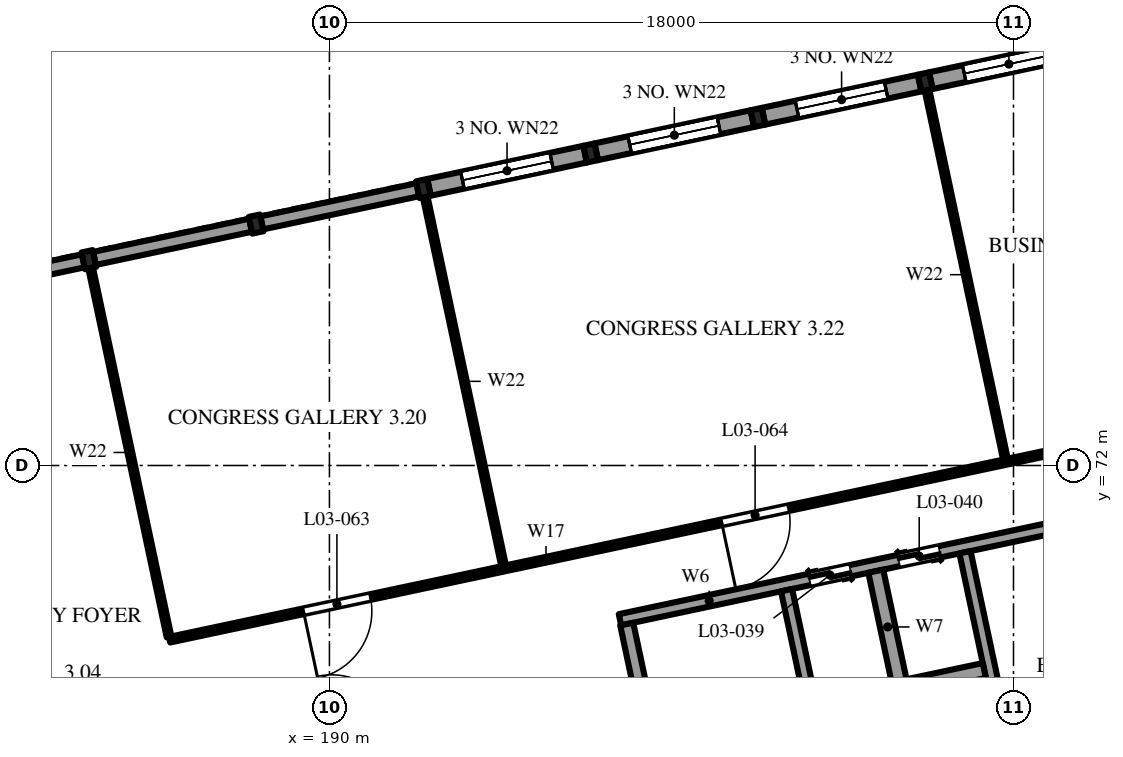
"""IFC4 building model, lengths in metres.
Left out: names, types, materials, properties, quantities, classifications, styles, units other than length and angle.
Written with IfcOpenShell. Run it as: python <this file> out.ifc"""

import sys

from ifc_helpers import new_model, si_unit, direction, frame, frame_2d, origin, origin_2d, place, context, subcontext, project, spatial, polyline, rectangle, i_section, outline, extrude, element, fill, save


model = new_model("IFC4")
c1 = context("Model", 3, precision=1e-05, world=origin(), true_north=direction((0.0, 1.0)))
c2 = subcontext(c1, "Body", "Model", "MODEL_VIEW")
j1 = project(units=[si_unit("LENGTHUNIT", "METRE"), si_unit("PLANEANGLEUNIT", "RADIAN")], contexts=[c1])
p1 = place(None, origin())
s1 = spatial("IfcSite", under=j1, at=p1, CompositionType="ELEMENT")
p2 = place(p1, origin())
s2 = spatial("IfcBuilding", under=s1, at=p2, CompositionType="ELEMENT")
p3 = place(p2, frame((0.0, 0.0, 16.8)))
s3 = spatial("IfcBuildingStorey", under=s2, at=p3, CompositionType="ELEMENT", Elevation=16.8)
for number, where, z_axis, x_axis in (
    (1, (183.669, 77.417, 0.0), (0.0, 0.0, 1.0), (0.978, 0.208, 0.0)),
    (2, (188.071, 78.353, 0.0), (0.0, 0.0, 1.0), (0.978, 0.208, 0.0)),
    (3, (192.473, 79.289, 0.0), (0.0, 0.0, 1.0), (0.978, 0.208, 0.0)),
    (4, (196.874, 80.224, 0.0), (0.0, 0.0, 1.0), (0.978, 0.208, 0.0)),
    (5, (201.276, 81.16, 0.0), (0.0, 0.0, 1.0), (0.978, 0.208, 0.0)),
    (6, (205.678, 82.095, 0.0), (0.0, 0.0, 1.0), (0.978, 0.208, 0.0)),
):
    element("IfcColumn", number, at=place(p3, frame(where, z_axis=z_axis, x_axis=x_axis)), inside=s3, PredefinedType="COLUMN", context=c2, shape_type="SweptSolid", body=[
        extrude(i_section(OverallWidth=0.3, OverallDepth=0.45, WebThickness=0.014, FlangeThickness=0.026, FilletRadius=0.027, at=origin_2d()), origin(), (0.0, 0.0, 1.0), 4.8),
    ])
p4 = place(p3, frame((197.645, 67.941, 0.0), z_axis=(0.0, 0.0, 1.0), x_axis=(0.978147662755, 0.20791139903, 0.0)))
e7 = element("IfcWall", 7, at=p4, inside=s3, PredefinedType="SHEAR", context=c2, shape_type="SweptSolid", body=[
    extrude(outline(polyline([(0.0, 0.0), (13.7, 0.0), (13.7, 14.542), (0.0, 13.809), (0.0, 0.0)])), frame((0.0, 0.15, 0.0), z_axis=(0.0, -1.0, 0.0), x_axis=(1.0, 0.0, 0.0)), (0.0, 0.0, 1.0), 0.3),
])
p5 = place(p4, frame((5.1, 0.0, 0.0)))
e8 = element("IfcOpeningElement", 8, at=p5, cuts=e7, PredefinedType="OPENING", context=c2, shape_type="SweptSolid", body=[
    extrude(rectangle(XDim=1.1, YDim=2.1, at=frame_2d((0.55, 1.05))), frame((0.0, 0.16, 0.0), z_axis=(0.0, -1.0, 0.0), x_axis=(1.0, 0.0, 0.0)), (0.0, 0.0, 1.0), 0.32),
])
p6 = place(p4, frame((7.5, 0.0, 0.0)))
e9 = element("IfcOpeningElement", 9, at=p6, cuts=e7, PredefinedType="OPENING", context=c2, shape_type="SweptSolid", body=[
    extrude(rectangle(XDim=1.1, YDim=2.1, at=frame_2d((0.55, 1.05))), frame((0.0, 0.16, 0.0), z_axis=(0.0, -1.0, 0.0), x_axis=(1.0, 0.0, 0.0)), (0.0, 0.0, 1.0), 0.32),
])
p7 = place(p3, frame((199.486, 60.0, 0.0), z_axis=(0.0, 0.0, 1.0), x_axis=(-0.207915693476, 0.978146749934, 0.0)))
e10 = element("IfcWall", 10, at=p7, inside=s3, PredefinedType="SOLIDWALL", context=c2, shape_type="SweptSolid", body=[
    extrude(outline(polyline([(0.0, 0.0), (8.0, 0.0), (8.0, 13.824), (0.0, 14.244), (0.0, 0.0)])), frame((0.0, 0.175, 0.0), z_axis=(0.0, -1.0, 0.0), x_axis=(1.0, 0.0, 0.0)), (0.0, 0.0, 1.0), 0.35),
])
p8 = place(p7, frame((0.3, 0.0, 0.0)))
e11 = element("IfcOpeningElement", 11, at=p8, cuts=e10, PredefinedType="OPENING", context=c2, shape_type="SweptSolid", body=[
    extrude(rectangle(XDim=1.2, YDim=2.1, at=frame_2d((0.6, 1.05))), frame((0.0, 0.185, 0.0), z_axis=(0.0, -1.0, 0.0), x_axis=(1.0, 0.0, 0.0)), (0.0, 0.0, 1.0), 0.37),
])
p9 = place(p3, frame((203.692, 60.894, 0.0), z_axis=(0.0, 0.0, 1.0), x_axis=(-0.207915693476, 0.978146749934, 0.0)))
e12 = element("IfcWall", 12, at=p9, inside=s3, PredefinedType="SHEAR", context=c2, shape_type="SweptSolid", body=[
    extrude(outline(polyline([(0.0, 0.0), (8.0, 0.0), (8.0, 14.054), (0.0, 14.474), (0.0, 0.0)])), frame((0.0, 0.15, 0.0), z_axis=(0.0, -1.0, 0.0), x_axis=(1.0, 0.0, 0.0)), (0.0, 0.0, 1.0), 0.3),
])
p10 = place(p3, frame((208.387, 61.892, 0.0), z_axis=(0.0, 0.0, 1.0), x_axis=(-0.207915693476, 0.978146749934, 0.0)))
e13 = element("IfcWall", 13, at=p10, inside=s3, PredefinedType="SHEAR", context=c2, shape_type="SweptSolid", body=[
    extrude(outline(polyline([(0.0, 0.0), (8.0, 0.0), (8.0, 14.311), (0.0, 14.731), (0.0, 0.0)])), frame((0.0, 0.15, 0.0), z_axis=(0.0, -1.0, 0.0), x_axis=(1.0, 0.0, 0.0)), (0.0, 0.0, 1.0), 0.3),
])
p11 = place(p3, frame((205.0, 66.284, 0.0), z_axis=(0.0, 0.0, 1.0), x_axis=(-0.207933702079, 0.978142921837, 0.0)))
e14 = element("IfcWall", 14, at=p11, inside=s3, PredefinedType="SHEAR", context=c2, shape_type="SweptSolid", body=[
    extrude(outline(polyline([(0.0, 0.0), (3.0, 0.0), (3.0, 14.183), (0.0, 14.34), (0.0, 0.0)])), frame((0.0, 0.2, 0.0), z_axis=(0.0, -1.0, 0.0), x_axis=(1.0, 0.0, 0.0)), (0.0, 0.0, 1.0), 0.4),
])
p12 = place(p3, frame((202.831, 65.669, 0.0), z_axis=(0.0, 0.0, 1.0), x_axis=(0.978149611564, 0.20790223038, 0.0)))
e15 = element("IfcWall", 15, at=p12, inside=s3, PredefinedType="SHEAR", context=c2, shape_type="SweptSolid", body=[
    extrude(outline(polyline([(0.0, 0.0), (4.5, 0.0), (4.5, 14.469), (0.0, 14.228), (0.0, 0.0)])), frame((0.0, 0.2, 0.0), z_axis=(0.0, -1.0, 0.0), x_axis=(1.0, 0.0, 0.0)), (0.0, 0.0, 1.0), 0.4),
])
p13 = place(p3, frame((179.415, 76.513, 0.0), z_axis=(0.0, 0.0, 1.0), x_axis=(0.978155748334, 0.207873355681, 0.0)))
e16 = element("IfcWall", 16, at=p13, inside=s3, PredefinedType="SOLIDWALL", context=c2, shape_type="SweptSolid", body=[
    extrude(outline(polyline([(0.0, 0.0), (4.2, 0.0), (4.2, 13.836), (0.0, 13.612), (0.0, 0.0)])), frame((0.0, 0.175, 0.0), z_axis=(0.0, -1.0, 0.0), x_axis=(1.0, 0.0, 0.0)), (0.0, 0.0, 1.0), 0.35),
])
p14 = place(p3, frame((183.816, 77.448, 0.0), z_axis=(0.0, 0.0, 1.0), x_axis=(0.978143927149, 0.207928972925, 0.0)))
e17 = element("IfcWall", 17, at=p14, inside=s3, PredefinedType="SOLIDWALL", context=c2, shape_type="SweptSolid", body=[
    extrude(outline(polyline([(0.0, 0.0), (4.2, 0.0), (4.2, 14.077), (0.0, 13.853), (0.0, 0.0)])), frame((0.0, 0.175, 0.0), z_axis=(0.0, -1.0, 0.0), x_axis=(1.0, 0.0, 0.0)), (0.0, 0.0, 1.0), 0.35),
])
p15 = place(p3, frame((188.218, 78.384, 0.0), z_axis=(0.0, 0.0, 1.0), x_axis=(0.978143927149, 0.207928972925, 0.0)))
e18 = element("IfcWall", 18, at=p15, inside=s3, PredefinedType="SOLIDWALL", context=c2, shape_type="SweptSolid", body=[
    extrude(outline(polyline([(0.0, 0.0), (4.2, 0.0), (4.2, 14.318), (0.0, 14.093), (0.0, 0.0)])), frame((0.0, 0.175, 0.0), z_axis=(0.0, -1.0, 0.0), x_axis=(1.0, 0.0, 0.0)), (0.0, 0.0, 1.0), 0.35),
])
p16 = place(p3, frame((192.619, 79.32, 0.0), z_axis=(0.0, 0.0, 1.0), x_axis=(0.978143927149, 0.207928972925, 0.0)))
e19 = element("IfcWall", 19, at=p16, inside=s3, PredefinedType="SOLIDWALL", context=c2, shape_type="SweptSolid", body=[
    extrude(outline(polyline([(0.0, 0.0), (4.2, 0.0), (4.2, 14.559), (0.0, 14.334), (0.0, 0.0)])), frame((0.0, 0.225, 0.0), z_axis=(0.0, -1.0, 0.0), x_axis=(1.0, 0.0, 0.0)), (0.0, 0.0, 1.0), 0.45),
])
p17 = place(p16, frame((0.9, 0.0, 0.9)))
e20 = element("IfcOpeningElement", 20, at=p17, cuts=e19, PredefinedType="OPENING", context=c2, shape_type="SweptSolid", body=[
    extrude(rectangle(XDim=2.4, YDim=2.4, at=frame_2d((1.2, 1.2))), frame((0.0, 0.235, 0.0), z_axis=(0.0, -1.0, 0.0), x_axis=(1.0, 0.0, 0.0)), (0.0, 0.0, 1.0), 0.47),
])
p18 = place(p16, frame((0.9, 0.0, 5.1)))
e21 = element("IfcOpeningElement", 21, at=p18, cuts=e19, PredefinedType="OPENING", context=c2, shape_type="SweptSolid", body=[
    extrude(rectangle(XDim=2.4, YDim=2.4, at=frame_2d((1.2, 1.2))), frame((0.0, 0.235, 0.0), z_axis=(0.0, -1.0, 0.0), x_axis=(1.0, 0.0, 0.0)), (0.0, 0.0, 1.0), 0.47),
])
p19 = place(p16, frame((0.9, 0.0, 9.3)))
e22 = element("IfcOpeningElement", 22, at=p19, cuts=e19, PredefinedType="OPENING", context=c2, shape_type="SweptSolid", body=[
    extrude(rectangle(XDim=2.4, YDim=2.4, at=frame_2d((1.2, 1.2))), frame((0.0, 0.235, 0.0), z_axis=(0.0, -1.0, 0.0), x_axis=(1.0, 0.0, 0.0)), (0.0, 0.0, 1.0), 0.47),
])
p20 = place(p3, frame((197.021, 80.255, 0.0), z_axis=(0.0, 0.0, 1.0), x_axis=(0.97815826, 0.207861536591, 0.0)))
e23 = element("IfcWall", 23, at=p20, inside=s3, PredefinedType="SOLIDWALL", context=c2, shape_type="SweptSolid", body=[
    extrude(outline(polyline([(0.0, 0.0), (4.2, 0.0), (4.2, 14.8), (0.0, 14.575), (0.0, 0.0)])), frame((0.0, 0.225, 0.0), z_axis=(0.0, -1.0, 0.0), x_axis=(1.0, 0.0, 0.0)), (0.0, 0.0, 1.0), 0.45),
])
p21 = place(p20, frame((0.9, 0.0, 0.9)))
e24 = element("IfcOpeningElement", 24, at=p21, cuts=e23, PredefinedType="OPENING", context=c2, shape_type="SweptSolid", body=[
    extrude(rectangle(XDim=2.4, YDim=2.4, at=frame_2d((1.2, 1.2))), frame((0.0, 0.235, 0.0), z_axis=(0.0, -1.0, 0.0), x_axis=(1.0, 0.0, 0.0)), (0.0, 0.0, 1.0), 0.47),
])
p22 = place(p20, frame((0.9, 0.0, 5.1)))
e25 = element("IfcOpeningElement", 25, at=p22, cuts=e23, PredefinedType="OPENING", context=c2, shape_type="SweptSolid", body=[
    extrude(rectangle(XDim=2.4, YDim=2.4, at=frame_2d((1.2, 1.2))), frame((0.0, 0.235, 0.0), z_axis=(0.0, -1.0, 0.0), x_axis=(1.0, 0.0, 0.0)), (0.0, 0.0, 1.0), 0.47),
])
p23 = place(p20, frame((0.9, 0.0, 9.3)))
e26 = element("IfcOpeningElement", 26, at=p23, cuts=e23, PredefinedType="OPENING", context=c2, shape_type="SweptSolid", body=[
    extrude(rectangle(XDim=2.4, YDim=2.4, at=frame_2d((1.2, 1.2))), frame((0.0, 0.235, 0.0), z_axis=(0.0, -1.0, 0.0), x_axis=(1.0, 0.0, 0.0)), (0.0, 0.0, 1.0), 0.47),
])
p24 = place(p3, frame((201.423, 81.191, 0.0), z_axis=(0.0, 0.0, 1.0), x_axis=(0.978155748334, 0.207873355681, 0.0)))
e27 = element("IfcWall", 27, at=p24, inside=s3, PredefinedType="SOLIDWALL", context=c2, shape_type="SweptSolid", body=[
    extrude(outline(polyline([(0.0, 0.0), (4.2, 0.0), (4.2, 15.04), (0.0, 14.816), (0.0, 0.0)])), frame((0.0, 0.225, 0.0), z_axis=(0.0, -1.0, 0.0), x_axis=(1.0, 0.0, 0.0)), (0.0, 0.0, 1.0), 0.45),
])
p25 = place(p24, frame((0.9, 0.0, 0.9)))
e28 = element("IfcOpeningElement", 28, at=p25, cuts=e27, PredefinedType="OPENING", context=c2, shape_type="SweptSolid", body=[
    extrude(rectangle(XDim=2.4, YDim=2.4, at=frame_2d((1.2, 1.2))), frame((0.0, 0.235, 0.0), z_axis=(0.0, -1.0, 0.0), x_axis=(1.0, 0.0, 0.0)), (0.0, 0.0, 1.0), 0.47),
])
p26 = place(p24, frame((0.9, 0.0, 5.1)))
e29 = element("IfcOpeningElement", 29, at=p26, cuts=e27, PredefinedType="OPENING", context=c2, shape_type="SweptSolid", body=[
    extrude(rectangle(XDim=2.4, YDim=2.4, at=frame_2d((1.2, 1.2))), frame((0.0, 0.235, 0.0), z_axis=(0.0, -1.0, 0.0), x_axis=(1.0, 0.0, 0.0)), (0.0, 0.0, 1.0), 0.47),
])
p27 = place(p24, frame((0.9, 0.0, 9.3)))
e30 = element("IfcOpeningElement", 30, at=p27, cuts=e27, PredefinedType="OPENING", context=c2, shape_type="SweptSolid", body=[
    extrude(rectangle(XDim=2.4, YDim=2.4, at=frame_2d((1.2, 1.2))), frame((0.0, 0.235, 0.0), z_axis=(0.0, -1.0, 0.0), x_axis=(1.0, 0.0, 0.0)), (0.0, 0.0, 1.0), 0.47),
])
p28 = place(p3, frame((205.824, 82.126, 0.0), z_axis=(0.0, 0.0, 1.0), x_axis=(0.978143927149, 0.207928972925, 0.0)))
e31 = element("IfcWall", 31, at=p28, inside=s3, PredefinedType="SOLIDWALL", context=c2, shape_type="SweptSolid", body=[
    extrude(outline(polyline([(0.0, 0.0), (4.2, 0.0), (4.2, 15.281), (0.0, 15.056), (0.0, 0.0)])), frame((0.0, 0.225, 0.0), z_axis=(0.0, -1.0, 0.0), x_axis=(1.0, 0.0, 0.0)), (0.0, 0.0, 1.0), 0.45),
])
p29 = place(p28, frame((0.9, 0.0, 0.9)))
e32 = element("IfcOpeningElement", 32, at=p29, cuts=e31, PredefinedType="OPENING", context=c2, shape_type="SweptSolid", body=[
    extrude(rectangle(XDim=2.4, YDim=2.4, at=frame_2d((1.2, 1.2))), frame((0.0, 0.235, 0.0), z_axis=(0.0, -1.0, 0.0), x_axis=(1.0, 0.0, 0.0)), (0.0, 0.0, 1.0), 0.47),
])
p30 = place(p28, frame((0.9, 0.0, 5.1)))
e33 = element("IfcOpeningElement", 33, at=p30, cuts=e31, PredefinedType="OPENING", context=c2, shape_type="SweptSolid", body=[
    extrude(rectangle(XDim=2.4, YDim=2.4, at=frame_2d((1.2, 1.2))), frame((0.0, 0.235, 0.0), z_axis=(0.0, -1.0, 0.0), x_axis=(1.0, 0.0, 0.0)), (0.0, 0.0, 1.0), 0.47),
])
p31 = place(p28, frame((0.9, 0.0, 9.3)))
e34 = element("IfcOpeningElement", 34, at=p31, cuts=e31, PredefinedType="OPENING", context=c2, shape_type="SweptSolid", body=[
    extrude(rectangle(XDim=2.4, YDim=2.4, at=frame_2d((1.2, 1.2))), frame((0.0, 0.235, 0.0), z_axis=(0.0, -1.0, 0.0), x_axis=(1.0, 0.0, 0.0)), (0.0, 0.0, 1.0), 0.47),
])
p32 = place(p3, frame((185.795, 67.416, 0.0), z_axis=(0.0, 0.0, 1.0), x_axis=(0.978148801969, 0.20790603937, 0.0)))
e35 = element("IfcWall", 35, at=p32, inside=s3, PredefinedType="PARTITIONING", context=c2, shape_type="SweptSolid", body=[
    extrude(outline(polyline([(0.0, 0.0), (29.95, 0.0), (29.95, 13.883), (0.0, 12.28), (0.0, 0.0)])), frame((0.0, 0.075, 0.0), z_axis=(0.0, -1.0, 0.0), x_axis=(1.0, 0.0, 0.0)), (0.0, 0.0, 1.0), 0.15),
])
p33 = place(p32, frame((3.6, 0.0, 0.0)))
e36 = element("IfcOpeningElement", 36, at=p33, cuts=e35, PredefinedType="OPENING", context=c2, shape_type="SweptSolid", body=[
    extrude(rectangle(XDim=1.8, YDim=2.1, at=frame_2d((0.9, 1.05))), frame((0.0, 0.085, 0.0), z_axis=(0.0, -1.0, 0.0), x_axis=(1.0, 0.0, 0.0)), (0.0, 0.0, 1.0), 0.17),
])
p34 = place(p32, frame((14.85, 0.0, 0.0)))
e37 = element("IfcOpeningElement", 37, at=p34, cuts=e35, PredefinedType="OPENING", context=c2, shape_type="SweptSolid", body=[
    extrude(rectangle(XDim=1.8, YDim=2.1, at=frame_2d((0.9, 1.05))), frame((0.0, 0.085, 0.0), z_axis=(0.0, -1.0, 0.0), x_axis=(1.0, 0.0, 0.0)), (0.0, 0.0, 1.0), 0.17),
])
p35 = place(p32, frame((25.725, 0.0, 0.0)))
e38 = element("IfcOpeningElement", 38, at=p35, cuts=e35, PredefinedType="OPENING", context=c2, shape_type="SweptSolid", body=[
    extrude(rectangle(XDim=1.0, YDim=2.1, at=frame_2d((0.5, 1.05))), frame((0.0, 0.085, 0.0), z_axis=(0.0, -1.0, 0.0), x_axis=(1.0, 0.0, 0.0)), (0.0, 0.0, 1.0), 0.17),
])
p36 = place(p3, frame((183.716, 77.197, 0.0), z_axis=(0.0, 0.0, 1.0), x_axis=(0.207927890391, -0.978144157268, 0.0)))
e39 = element("IfcWall", 39, at=p36, inside=s3, PredefinedType="PARTITIONING", context=c2, shape_type="SweptSolid", body=[
    extrude(outline(polyline([(0.0, 0.0), (9.925, 0.0), (9.925, 11.751), (0.0, 11.751), (0.0, 0.0)])), frame((0.0, 0.062, 0.0), z_axis=(0.0, -1.0, 0.0), x_axis=(1.0, 0.0, 0.0)), (0.0, 0.0, 1.0), 0.125),
])
p37 = place(p3, frame((192.52, 79.068, 0.0), z_axis=(0.0, 0.0, 1.0), x_axis=(0.20790935802, -0.978148096582, 0.0)))
e40 = element("IfcWall", 40, at=p37, inside=s3, PredefinedType="PARTITIONING", context=c2, shape_type="SweptSolid", body=[
    extrude(outline(polyline([(0.0, 0.0), (9.925, 0.0), (9.925, 12.233), (0.0, 12.233), (0.0, 0.0)])), frame((0.0, 0.062, 0.0), z_axis=(0.0, -1.0, 0.0), x_axis=(1.0, 0.0, 0.0)), (0.0, 0.0, 1.0), 0.125),
])
p38 = place(p3, frame((205.724, 81.875, 0.0), z_axis=(0.0, 0.0, 1.0), x_axis=(0.207927890391, -0.978144157268, 0.0)))
e41 = element("IfcWall", 41, at=p38, inside=s3, PredefinedType="PARTITIONING", context=c2, shape_type="SweptSolid", body=[
    extrude(outline(polyline([(0.0, 0.0), (9.925, 0.0), (9.925, 13.256), (0.0, 12.96), (0.0, 0.0)])), frame((0.0, 0.062, 0.0), z_axis=(0.0, -1.0, 0.0), x_axis=(1.0, 0.0, 0.0)), (0.0, 0.0, 1.0), 0.125),
])
p39 = place(p17, origin())
e42 = element("IfcWindow", 42, at=p39, inside=s3, PartitioningType="SINGLE_PANEL", PredefinedType="WINDOW", context=c2, shape_type="SweptSolid", body=[
    extrude(rectangle(XDim=2.4, YDim=2.4, at=frame_2d((1.2, 1.2))), frame((0.0, 0.03, 0.0), z_axis=(0.0, -1.0, 0.0), x_axis=(1.0, 0.0, 0.0)), (0.0, 0.0, 1.0), 0.06),
])
fill(e20, e42)
p40 = place(p18, origin())
e43 = element("IfcWindow", 43, at=p40, inside=s3, PartitioningType="SINGLE_PANEL", PredefinedType="WINDOW", context=c2, shape_type="SweptSolid", body=[
    extrude(rectangle(XDim=2.4, YDim=2.4, at=frame_2d((1.2, 1.2))), frame((0.0, 0.03, 0.0), z_axis=(0.0, -1.0, 0.0), x_axis=(1.0, 0.0, 0.0)), (0.0, 0.0, 1.0), 0.06),
])
fill(e21, e43)
p41 = place(p19, origin())
e44 = element("IfcWindow", 44, at=p41, inside=s3, PartitioningType="SINGLE_PANEL", PredefinedType="WINDOW", context=c2, shape_type="SweptSolid", body=[
    extrude(rectangle(XDim=2.4, YDim=2.4, at=frame_2d((1.2, 1.2))), frame((0.0, 0.03, 0.0), z_axis=(0.0, -1.0, 0.0), x_axis=(1.0, 0.0, 0.0)), (0.0, 0.0, 1.0), 0.06),
])
fill(e22, e44)
p42 = place(p21, origin())
e45 = element("IfcWindow", 45, at=p42, inside=s3, PartitioningType="SINGLE_PANEL", PredefinedType="WINDOW", context=c2, shape_type="SweptSolid", body=[
    extrude(rectangle(XDim=2.4, YDim=2.4, at=frame_2d((1.2, 1.2))), frame((0.0, 0.03, 0.0), z_axis=(0.0, -1.0, 0.0), x_axis=(1.0, 0.0, 0.0)), (0.0, 0.0, 1.0), 0.06),
])
fill(e24, e45)
p43 = place(p22, origin())
e46 = element("IfcWindow", 46, at=p43, inside=s3, PartitioningType="SINGLE_PANEL", PredefinedType="WINDOW", context=c2, shape_type="SweptSolid", body=[
    extrude(rectangle(XDim=2.4, YDim=2.4, at=frame_2d((1.2, 1.2))), frame((0.0, 0.03, 0.0), z_axis=(0.0, -1.0, 0.0), x_axis=(1.0, 0.0, 0.0)), (0.0, 0.0, 1.0), 0.06),
])
fill(e25, e46)
p44 = place(p23, origin())
e47 = element("IfcWindow", 47, at=p44, inside=s3, PartitioningType="SINGLE_PANEL", PredefinedType="WINDOW", context=c2, shape_type="SweptSolid", body=[
    extrude(rectangle(XDim=2.4, YDim=2.4, at=frame_2d((1.2, 1.2))), frame((0.0, 0.03, 0.0), z_axis=(0.0, -1.0, 0.0), x_axis=(1.0, 0.0, 0.0)), (0.0, 0.0, 1.0), 0.06),
])
fill(e26, e47)
p45 = place(p25, origin())
e48 = element("IfcWindow", 48, at=p45, inside=s3, PartitioningType="SINGLE_PANEL", PredefinedType="WINDOW", context=c2, shape_type="SweptSolid", body=[
    extrude(rectangle(XDim=2.4, YDim=2.4, at=frame_2d((1.2, 1.2))), frame((0.0, 0.03, 0.0), z_axis=(0.0, -1.0, 0.0), x_axis=(1.0, 0.0, 0.0)), (0.0, 0.0, 1.0), 0.06),
])
fill(e28, e48)
p46 = place(p26, origin())
e49 = element("IfcWindow", 49, at=p46, inside=s3, PartitioningType="SINGLE_PANEL", PredefinedType="WINDOW", context=c2, shape_type="SweptSolid", body=[
    extrude(rectangle(XDim=2.4, YDim=2.4, at=frame_2d((1.2, 1.2))), frame((0.0, 0.03, 0.0), z_axis=(0.0, -1.0, 0.0), x_axis=(1.0, 0.0, 0.0)), (0.0, 0.0, 1.0), 0.06),
])
fill(e29, e49)
p47 = place(p27, origin())
e50 = element("IfcWindow", 50, at=p47, inside=s3, PartitioningType="SINGLE_PANEL", PredefinedType="WINDOW", context=c2, shape_type="SweptSolid", body=[
    extrude(rectangle(XDim=2.4, YDim=2.4, at=frame_2d((1.2, 1.2))), frame((0.0, 0.03, 0.0), z_axis=(0.0, -1.0, 0.0), x_axis=(1.0, 0.0, 0.0)), (0.0, 0.0, 1.0), 0.06),
])
fill(e30, e50)
p48 = place(p29, origin())
e51 = element("IfcWindow", 51, at=p48, inside=s3, PartitioningType="SINGLE_PANEL", PredefinedType="WINDOW", context=c2, shape_type="SweptSolid", body=[
    extrude(rectangle(XDim=2.4, YDim=2.4, at=frame_2d((1.2, 1.2))), frame((0.0, 0.03, 0.0), z_axis=(0.0, -1.0, 0.0), x_axis=(1.0, 0.0, 0.0)), (0.0, 0.0, 1.0), 0.06),
])
fill(e32, e51)
p49 = place(p30, origin())
e52 = element("IfcWindow", 52, at=p49, inside=s3, PartitioningType="SINGLE_PANEL", PredefinedType="WINDOW", context=c2, shape_type="SweptSolid", body=[
    extrude(rectangle(XDim=2.4, YDim=2.4, at=frame_2d((1.2, 1.2))), frame((0.0, 0.03, 0.0), z_axis=(0.0, -1.0, 0.0), x_axis=(1.0, 0.0, 0.0)), (0.0, 0.0, 1.0), 0.06),
])
fill(e33, e52)
p50 = place(p31, origin())
e53 = element("IfcWindow", 53, at=p50, inside=s3, PartitioningType="SINGLE_PANEL", PredefinedType="WINDOW", context=c2, shape_type="SweptSolid", body=[
    extrude(rectangle(XDim=2.4, YDim=2.4, at=frame_2d((1.2, 1.2))), frame((0.0, 0.03, 0.0), z_axis=(0.0, -1.0, 0.0), x_axis=(1.0, 0.0, 0.0)), (0.0, 0.0, 1.0), 0.06),
])
fill(e34, e53)
p51 = place(p5, origin())
e54 = element("IfcDoor", 54, at=p51, inside=s3, OperationType="DOUBLE_DOOR_SLIDING", PredefinedType="DOOR", context=c2, shape_type="SweptSolid", body=[
    extrude(rectangle(XDim=1.1, YDim=2.1, at=frame_2d((0.55, 1.05))), frame((0.0, 0.025, 0.0), z_axis=(0.0, -1.0, 0.0), x_axis=(1.0, 0.0, 0.0)), (0.0, 0.0, 1.0), 0.05),
])
fill(e8, e54)
p52 = place(p6, origin())
e55 = element("IfcDoor", 55, at=p52, inside=s3, OperationType="DOUBLE_DOOR_SLIDING", PredefinedType="DOOR", context=c2, shape_type="SweptSolid", body=[
    extrude(rectangle(XDim=1.1, YDim=2.1, at=frame_2d((0.55, 1.05))), frame((0.0, 0.025, 0.0), z_axis=(0.0, -1.0, 0.0), x_axis=(1.0, 0.0, 0.0)), (0.0, 0.0, 1.0), 0.05),
])
fill(e9, e55)
p53 = place(p33, frame((1.8, 0.0, 0.0), z_axis=(0.0, 0.0, 1.0), x_axis=(-1.0, 0.0, 0.0)))
e56 = element("IfcDoor", 56, at=p53, inside=s3, OperationType="DOUBLE_DOOR_SINGLE_SWING", PredefinedType="DOOR", context=c2, shape_type="SweptSolid", body=[
    extrude(rectangle(XDim=1.8, YDim=2.1, at=frame_2d((0.9, 1.05))), frame((0.0, 0.025, 0.0), z_axis=(0.0, -1.0, 0.0), x_axis=(1.0, 0.0, 0.0)), (0.0, 0.0, 1.0), 0.05),
])
fill(e36, e56)
p54 = place(p34, frame((1.8, 0.0, 0.0), z_axis=(0.0, 0.0, 1.0), x_axis=(-1.0, 0.0, 0.0)))
e57 = element("IfcDoor", 57, at=p54, inside=s3, OperationType="DOUBLE_DOOR_SINGLE_SWING", PredefinedType="DOOR", context=c2, shape_type="SweptSolid", body=[
    extrude(rectangle(XDim=1.8, YDim=2.1, at=frame_2d((0.9, 1.05))), frame((0.0, 0.025, 0.0), z_axis=(0.0, -1.0, 0.0), x_axis=(1.0, 0.0, 0.0)), (0.0, 0.0, 1.0), 0.05),
])
fill(e37, e57)
save(model, sys.argv[1])
